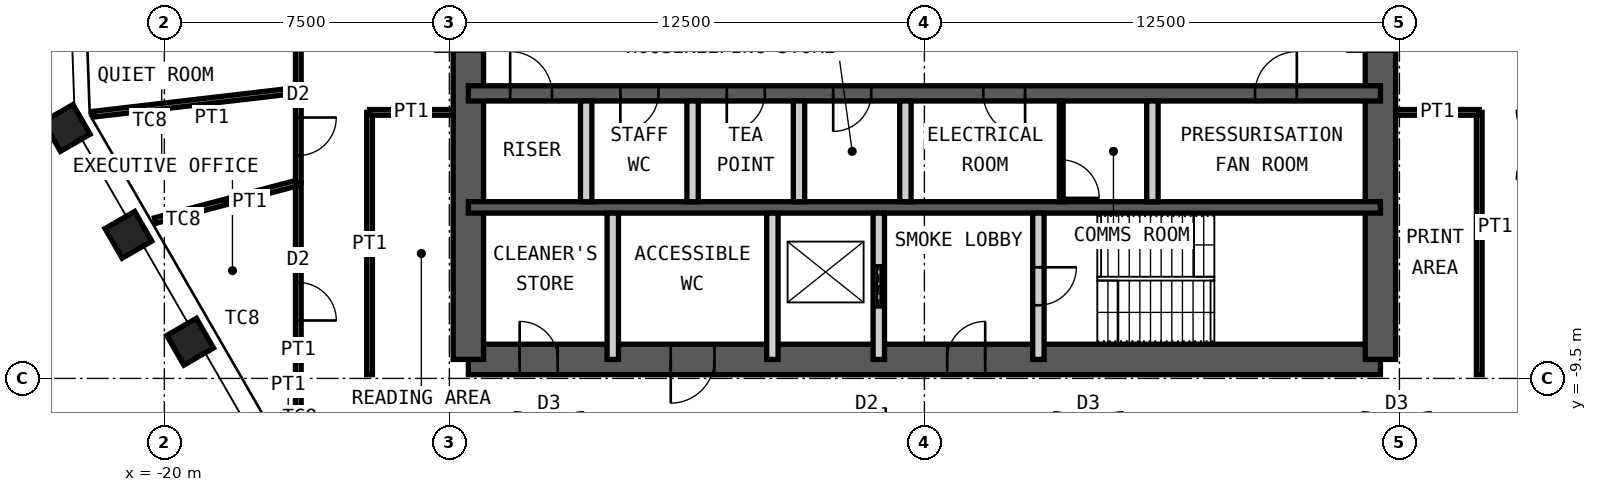
"""IFC4 building model, lengths in metres.
Left out: names, types, materials, properties, quantities, classifications, styles, units other than length and angle.
Written with IfcOpenShell. Run it as: python <this file> out.ifc"""

import sys

from ifc_helpers import new_model, si_unit, direction, frame, frame_2d, origin, origin_2d, place, context, subcontext, project, spatial, rectangle, hollow_rectangle, extrude, element, fill, save


model = new_model("IFC4")
c1 = context("Model", 3, precision=1e-05, world=origin(), true_north=direction((0.0, 1.0)))
c2 = subcontext(c1, "Body", "Model", "MODEL_VIEW")
j1 = project(units=[si_unit("LENGTHUNIT", "METRE"), si_unit("PLANEANGLEUNIT", "RADIAN")], contexts=[c1])
p1 = place(None, origin())
s1 = spatial("IfcSite", under=j1, at=p1, CompositionType="ELEMENT")
p2 = place(p1, origin())
s2 = spatial("IfcBuilding", under=s1, at=p2, CompositionType="ELEMENT")
p3 = place(p2, frame((0.0, 0.0, 325.0)))
s3 = spatial("IfcBuildingStorey", under=s2, at=p3, CompositionType="ELEMENT", Elevation=325.0)
for number, where, z_axis, x_axis in (
    (1, (-19.322, -8.534, 0.0), (0.0, 0.0, 1.0), (0.5, -0.866, 0.0)),
    (2, (-20.946, -5.721, 0.0), (0.0, 0.0, 1.0), (0.5, -0.866, 0.0)),
    (3, (-22.57, -2.908, 0.0), (0.0, 0.0, 1.0), (0.5, -0.866, 0.0)),
):
    element("IfcColumn", number, at=place(p3, frame(where, z_axis=z_axis, x_axis=x_axis)), inside=s3, PredefinedType="COLUMN", context=c2, shape_type="SweptSolid", body=[
        extrude(hollow_rectangle(XDim=0.9, YDim=0.9, WallThickness=0.05, at=origin_2d()), origin(), (0.0, 0.0, 1.0), 4.2),
    ])
p4 = place(p3, frame((-12.0, -9.0, 0.0), z_axis=(0.0, 0.0, 1.0), x_axis=(1.0, 0.0, 0.0)))
e4 = element("IfcWall", 4, at=p4, inside=s3, PredefinedType="SHEAR", context=c2, shape_type="SweptSolid", body=[
    extrude(rectangle(XDim=24.0, YDim=0.8, at=frame_2d((12.0, 0.0))), origin(), (0.0, 0.0, 1.0), 4.2),
])
p5 = place(p4, frame((1.35, 0.0, 0.0)))
e5 = element("IfcOpeningElement", 5, at=p5, cuts=e4, PredefinedType="OPENING", context=c2, shape_type="SweptSolid", body=[
    extrude(rectangle(XDim=1.0, YDim=2.1, at=frame_2d((0.5, 1.05))), frame((0.0, 0.41, 0.0), z_axis=(0.0, -1.0, 0.0), x_axis=(1.0, 0.0, 0.0)), (0.0, 0.0, 1.0), 0.82),
])
p6 = place(p4, frame((5.325, 0.0, 0.0)))
e6 = element("IfcOpeningElement", 6, at=p6, cuts=e4, PredefinedType="OPENING", context=c2, shape_type="SweptSolid", body=[
    extrude(rectangle(XDim=1.15, YDim=2.1, at=frame_2d((0.575, 1.05))), frame((0.0, 0.41, 0.0), z_axis=(0.0, -1.0, 0.0), x_axis=(1.0, 0.0, 0.0)), (0.0, 0.0, 1.0), 0.82),
])
p7 = place(p4, frame((12.6, 0.0, 0.0)))
e7 = element("IfcOpeningElement", 7, at=p7, cuts=e4, PredefinedType="OPENING", context=c2, shape_type="SweptSolid", body=[
    extrude(rectangle(XDim=1.0, YDim=2.1, at=frame_2d((0.5, 1.05))), frame((0.0, 0.41, 0.0), z_axis=(0.0, -1.0, 0.0), x_axis=(1.0, 0.0, 0.0)), (0.0, 0.0, 1.0), 0.82),
])
p8 = place(p3, frame((12.0, -9.0, 0.0), z_axis=(0.0, 0.0, 1.0), x_axis=(0.0, 1.0, 0.0)))
e8 = element("IfcWall", 8, at=p8, inside=s3, PredefinedType="SHEAR", context=c2, shape_type="SweptSolid", body=[
    extrude(rectangle(XDim=18.0, YDim=0.8, at=frame_2d((9.0, 0.0))), origin(), (0.0, 0.0, 1.0), 4.2),
])
p9 = place(p8, frame((8.1, 0.0, 0.0)))
e9 = element("IfcOpeningElement", 9, at=p9, cuts=e8, PredefinedType="OPENING", context=c2, shape_type="SweptSolid", body=[
    extrude(rectangle(XDim=1.8, YDim=2.1, at=frame_2d((0.9, 1.05))), frame((0.0, 0.41, 0.0), z_axis=(0.0, -1.0, 0.0), x_axis=(1.0, 0.0, 0.0)), (0.0, 0.0, 1.0), 0.82),
])
p10 = place(p3, frame((-12.0, -9.0, 0.0), z_axis=(0.0, 0.0, 1.0), x_axis=(0.0, 1.0, 0.0)))
e10 = element("IfcWall", 10, at=p10, inside=s3, PredefinedType="SHEAR", context=c2, shape_type="SweptSolid", body=[
    extrude(rectangle(XDim=18.0, YDim=0.8, at=frame_2d((9.0, 0.0))), origin(), (0.0, 0.0, 1.0), 4.2),
])
p11 = place(p10, frame((8.1, 0.0, 0.0)))
e11 = element("IfcOpeningElement", 11, at=p11, cuts=e10, PredefinedType="OPENING", context=c2, shape_type="SweptSolid", body=[
    extrude(rectangle(XDim=1.8, YDim=2.1, at=frame_2d((0.9, 1.05))), frame((0.0, 0.41, 0.0), z_axis=(0.0, -1.0, 0.0), x_axis=(1.0, 0.0, 0.0)), (0.0, 0.0, 1.0), 0.82),
])
p12 = place(p3, frame((-12.0, -2.0, 0.0), z_axis=(0.0, 0.0, 1.0), x_axis=(1.0, 0.0, 0.0)))
e12 = element("IfcWall", 12, at=p12, inside=s3, PredefinedType="SHEAR", context=c2, shape_type="SweptSolid", body=[
    extrude(rectangle(XDim=24.0, YDim=0.4, at=frame_2d((12.0, 0.0))), origin(), (0.0, 0.0, 1.0), 4.2),
])
p13 = place(p12, frame((1.1, 0.0, 0.0)))
e13 = element("IfcOpeningElement", 13, at=p13, cuts=e12, PredefinedType="OPENING", context=c2, shape_type="SweptSolid", body=[
    extrude(rectangle(XDim=1.1, YDim=2.1, at=frame_2d((0.55, 1.05))), frame((0.0, 0.21, 0.0), z_axis=(0.0, -1.0, 0.0), x_axis=(1.0, 0.0, 0.0)), (0.0, 0.0, 1.0), 0.42),
])
p14 = place(p12, frame((13.55, 0.0, 0.0)))
e14 = element("IfcOpeningElement", 14, at=p14, cuts=e12, PredefinedType="OPENING", context=c2, shape_type="SweptSolid", body=[
    extrude(rectangle(XDim=1.1, YDim=2.1, at=frame_2d((0.55, 1.05))), frame((0.0, 0.21, 0.0), z_axis=(0.0, -1.0, 0.0), x_axis=(1.0, 0.0, 0.0)), (0.0, 0.0, 1.0), 0.42),
])
p15 = place(p12, frame((20.7, 0.0, 0.0)))
e15 = element("IfcOpeningElement", 15, at=p15, cuts=e12, PredefinedType="OPENING", context=c2, shape_type="SweptSolid", body=[
    extrude(rectangle(XDim=1.1, YDim=2.1, at=frame_2d((0.55, 1.05))), frame((0.0, 0.21, 0.0), z_axis=(0.0, -1.0, 0.0), x_axis=(1.0, 0.0, 0.0)), (0.0, 0.0, 1.0), 0.42),
])
p16 = place(p12, frame((4.0, 0.0, 0.0)))
e16 = element("IfcOpeningElement", 16, at=p16, cuts=e12, PredefinedType="OPENING", context=c2, shape_type="SweptSolid", body=[
    extrude(rectangle(XDim=1.0, YDim=2.1, at=frame_2d((0.5, 1.05))), frame((0.0, 0.21, 0.0), z_axis=(0.0, -1.0, 0.0), x_axis=(1.0, 0.0, 0.0)), (0.0, 0.0, 1.0), 0.42),
])
p17 = place(p12, frame((6.8, 0.0, 0.0)))
e17 = element("IfcOpeningElement", 17, at=p17, cuts=e12, PredefinedType="OPENING", context=c2, shape_type="SweptSolid", body=[
    extrude(rectangle(XDim=1.0, YDim=2.1, at=frame_2d((0.5, 1.05))), frame((0.0, 0.21, 0.0), z_axis=(0.0, -1.0, 0.0), x_axis=(1.0, 0.0, 0.0)), (0.0, 0.0, 1.0), 0.42),
])
p18 = place(p12, frame((9.6, 0.0, 0.0)))
e18 = element("IfcOpeningElement", 18, at=p18, cuts=e12, PredefinedType="OPENING", context=c2, shape_type="SweptSolid", body=[
    extrude(rectangle(XDim=1.0, YDim=2.1, at=frame_2d((0.5, 1.05))), frame((0.0, 0.21, 0.0), z_axis=(0.0, -1.0, 0.0), x_axis=(1.0, 0.0, 0.0)), (0.0, 0.0, 1.0), 0.42),
])
p19 = place(p3, frame((-12.0, -5.0, 0.0), z_axis=(0.0, 0.0, 1.0), x_axis=(1.0, 0.0, 0.0)))
e19 = element("IfcWall", 19, at=p19, inside=s3, PredefinedType="SHEAR", context=c2, shape_type="SweptSolid", body=[
    extrude(rectangle(XDim=24.0, YDim=0.3, at=frame_2d((12.0, 0.0))), origin(), (0.0, 0.0, 1.0), 4.2),
])
for number, where, z_axis, x_axis in (
    (20, (-8.9, -4.85, 0.0), (0.0, 0.0, 1.0), (0.0, 1.0, 0.0)),
    (21, (-6.1, -4.85, 0.0), (0.0, 0.0, 1.0), (0.0, 1.0, 0.0)),
    (22, (-3.3, -4.85, 0.0), (0.0, 0.0, 1.0), (0.0, 1.0, 0.0)),
    (23, (-0.5, -4.85, 0.0), (0.0, 0.0, 1.0), (0.0, 1.0, 0.0)),
    (24, (6.0, -4.85, 0.0), (0.0, 0.0, 1.0), (0.0, 1.0, 0.0)),
):
    element("IfcWall", number, at=place(p3, frame(where, z_axis=z_axis, x_axis=x_axis)), inside=s3, PredefinedType="PARTITIONING", context=c2, shape_type="SweptSolid", body=[
        extrude(rectangle(XDim=2.65, YDim=0.3, at=frame_2d((1.325, 0.0))), origin(), (0.0, 0.0, 1.0), 3.98),
    ])
for number, where, z_axis, x_axis in (
    (25, (-8.2, -9.0, 0.0), (0.0, 0.0, 1.0), (0.0, 1.0, 0.0)),
    (26, (-4.0, -9.0, 0.0), (0.0, 0.0, 1.0), (0.0, 1.0, 0.0)),
):
    element("IfcWall", number, at=place(p3, frame(where, z_axis=z_axis, x_axis=x_axis)), inside=s3, PredefinedType="PARTITIONING", context=c2, shape_type="SweptSolid", body=[
        extrude(rectangle(XDim=3.85, YDim=0.3, at=frame_2d((1.925, 0.0))), origin(), (0.0, 0.0, 1.0), 3.98),
    ])
p20 = place(p3, frame((-1.2, -9.0, 0.0), z_axis=(0.0, 0.0, 1.0), x_axis=(0.0, 1.0, 0.0)))
e27 = element("IfcWall", 27, at=p20, inside=s3, PredefinedType="PARTITIONING", context=c2, shape_type="SweptSolid", body=[
    extrude(rectangle(XDim=3.85, YDim=0.3, at=frame_2d((1.925, 0.0))), origin(), (0.0, 0.0, 1.0), 3.98),
])
p21 = place(p20, frame((1.375, 0.0, 0.0)))
e28 = element("IfcOpeningElement", 28, at=p21, cuts=e27, PredefinedType="OPENING", context=c2, shape_type="SweptSolid", body=[
    extrude(rectangle(XDim=1.1, YDim=2.4, at=frame_2d((0.55, 1.2))), frame((0.0, 0.16, 0.0), z_axis=(0.0, -1.0, 0.0), x_axis=(1.0, 0.0, 0.0)), (0.0, 0.0, 1.0), 0.32),
])
p22 = place(p3, frame((3.0, -9.0, 0.0), z_axis=(0.0, 0.0, 1.0), x_axis=(0.0, 1.0, 0.0)))
e29 = element("IfcWall", 29, at=p22, inside=s3, PredefinedType="PARTITIONING", context=c2, shape_type="SweptSolid", body=[
    extrude(rectangle(XDim=3.85, YDim=0.3, at=frame_2d((1.925, 0.0))), origin(), (0.0, 0.0, 1.0), 3.98),
])
p23 = place(p22, frame((1.425, 0.0, 0.0)))
e30 = element("IfcOpeningElement", 30, at=p23, cuts=e29, PredefinedType="OPENING", context=c2, shape_type="SweptSolid", body=[
    extrude(rectangle(XDim=1.0, YDim=2.1, at=frame_2d((0.5, 1.05))), frame((0.0, 0.16, 0.0), z_axis=(0.0, -1.0, 0.0), x_axis=(1.0, 0.0, 0.0)), (0.0, 0.0, 1.0), 0.32),
])
p24 = place(p3, frame((3.6, -4.85, 0.0), z_axis=(0.0, 0.0, 1.0), x_axis=(0.0, 1.0, 0.0)))
e31 = element("IfcWall", 31, at=p24, inside=s3, PredefinedType="PARTITIONING", context=c2, shape_type="SweptSolid", body=[
    extrude(rectangle(XDim=2.65, YDim=0.1, at=frame_2d((1.325, 0.0))), origin(), (0.0, 0.0, 1.0), 3.98),
])
p25 = place(p24, frame((0.1, 0.0, 0.0)))
e32 = element("IfcOpeningElement", 32, at=p25, cuts=e31, PredefinedType="OPENING", context=c2, shape_type="SweptSolid", body=[
    extrude(rectangle(XDim=1.0, YDim=2.4, at=frame_2d((0.5, 1.2))), frame((0.0, 0.06, 0.0), z_axis=(0.0, -1.0, 0.0), x_axis=(1.0, 0.0, 0.0)), (0.0, 0.0, 1.0), 0.12),
])
p26 = place(p3, frame((-16.475, -10.601, 0.0), z_axis=(0.0, 0.0, 1.0), x_axis=(0.0, 1.0, 0.0)))
e33 = element("IfcWall", 33, at=p26, inside=s3, PredefinedType="PARTITIONING", context=c2, shape_type="SweptSolid", body=[
    extrude(rectangle(XDim=6.25, YDim=0.15, at=frame_2d((3.125, 0.0))), origin(), (0.0, 0.0, 1.0), 4.03),
])
p27 = place(p26, frame((2.625, 0.0, 0.0)))
e34 = element("IfcOpeningElement", 34, at=p27, cuts=e33, PredefinedType="OPENING", context=c2, shape_type="SweptSolid", body=[
    extrude(rectangle(XDim=1.0, YDim=2.4, at=frame_2d((0.5, 1.2))), frame((0.0, 0.085, 0.0), z_axis=(0.0, -1.0, 0.0), x_axis=(1.0, 0.0, 0.0)), (0.0, 0.0, 1.0), 0.17),
])
p28 = place(p3, frame((-20.243, -5.346, 0.0), z_axis=(0.0, 0.0, 1.0), x_axis=(0.966843659694, 0.25536902261, 0.0)))
e35 = element("IfcWall", 35, at=p28, inside=s3, PredefinedType="PARTITIONING", context=c2, shape_type="SweptSolid", body=[
    extrude(rectangle(XDim=3.897, YDim=0.15, at=frame_2d((1.948, 0.0))), origin(), (0.0, 0.0, 1.0), 3.33),
])
p29 = place(p3, frame((-16.475, -4.351, 0.0), z_axis=(0.0, 0.0, 1.0), x_axis=(0.0, 1.0, 0.0)))
e36 = element("IfcWall", 36, at=p29, inside=s3, PredefinedType="PARTITIONING", context=c2, shape_type="SweptSolid", body=[
    extrude(rectangle(XDim=2.432, YDim=0.15, at=frame_2d((1.216, 0.0))), origin(), (0.0, 0.0, 1.0), 4.03),
])
p30 = place(p29, frame((0.716, 0.0, 0.0)))
e37 = element("IfcOpeningElement", 37, at=p30, cuts=e36, PredefinedType="OPENING", context=c2, shape_type="SweptSolid", body=[
    extrude(rectangle(XDim=1.0, YDim=2.4, at=frame_2d((0.5, 1.2))), frame((0.0, 0.085, 0.0), z_axis=(0.0, -1.0, 0.0), x_axis=(1.0, 0.0, 0.0)), (0.0, 0.0, 1.0), 0.17),
])
p31 = place(p3, frame((-21.864, -2.547, 0.0), z_axis=(0.0, 0.0, 1.0), x_axis=(0.993284789299, 0.115694975458, 0.0)))
e38 = element("IfcWall", 38, at=p31, inside=s3, PredefinedType="PARTITIONING", context=c2, shape_type="SweptSolid", body=[
    extrude(rectangle(XDim=5.425, YDim=0.15, at=frame_2d((2.713, 0.0))), origin(), (0.0, 0.0, 1.0), 2.93),
])
p32 = place(p3, frame((-16.475, -1.919, 0.0), z_axis=(0.0, 0.0, 1.0), x_axis=(0.0, 1.0, 0.0)))
e39 = element("IfcWall", 39, at=p32, inside=s3, PredefinedType="PARTITIONING", context=c2, shape_type="SweptSolid", body=[
    extrude(rectangle(XDim=5.06, YDim=0.15, at=frame_2d((2.53, 0.0))), origin(), (0.0, 0.0, 1.0), 4.03),
])
p33 = place(p32, frame((2.03, 0.0, 0.0)))
e40 = element("IfcOpeningElement", 40, at=p33, cuts=e39, PredefinedType="OPENING", context=c2, shape_type="SweptSolid", body=[
    extrude(rectangle(XDim=1.0, YDim=2.4, at=frame_2d((0.5, 1.2))), frame((0.0, 0.085, 0.0), z_axis=(0.0, -1.0, 0.0), x_axis=(1.0, 0.0, 0.0)), (0.0, 0.0, 1.0), 0.17),
])
p34 = place(p3, frame((14.6, -9.4, 0.0), z_axis=(0.0, 0.0, 1.0), x_axis=(0.0, 1.0, 0.0)))
e41 = element("IfcWall", 41, at=p34, inside=s3, PredefinedType="PARTITIONING", context=c2, shape_type="SweptSolid", body=[
    extrude(rectangle(XDim=6.9, YDim=0.15, at=frame_2d((3.45, 0.0))), origin(), (0.0, 0.0, 1.0), 4.03),
])
p35 = place(p3, frame((12.4, -2.5, 0.0), z_axis=(0.0, 0.0, 1.0), x_axis=(1.0, 0.0, 0.0)))
e42 = element("IfcWall", 42, at=p35, inside=s3, PredefinedType="PARTITIONING", context=c2, shape_type="SweptSolid", body=[
    extrude(rectangle(XDim=2.2, YDim=0.15, at=frame_2d((1.1, 0.0))), origin(), (0.0, 0.0, 1.0), 3.33),
])
p36 = place(p3, frame((-14.6, -9.4, 0.0), z_axis=(0.0, 0.0, 1.0), x_axis=(0.0, 1.0, 0.0)))
e43 = element("IfcWall", 43, at=p36, inside=s3, PredefinedType="PARTITIONING", context=c2, shape_type="SweptSolid", body=[
    extrude(rectangle(XDim=6.9, YDim=0.15, at=frame_2d((3.45, 0.0))), origin(), (0.0, 0.0, 1.0), 4.03),
])
p37 = place(p3, frame((-12.4, -2.5, 0.0), z_axis=(0.0, 0.0, 1.0), x_axis=(-1.0, 0.0, 0.0)))
e44 = element("IfcWall", 44, at=p37, inside=s3, PredefinedType="PARTITIONING", context=c2, shape_type="SweptSolid", body=[
    extrude(rectangle(XDim=2.2, YDim=0.15, at=frame_2d((1.1, 0.0))), origin(), (0.0, 0.0, 1.0), 3.53),
])
p38 = place(p5, origin())
e45 = element("IfcDoor", 45, at=p38, inside=s3, OperationType="SINGLE_SWING_RIGHT", PredefinedType="DOOR", context=c2, shape_type="SweptSolid", body=[
    extrude(rectangle(XDim=1.0, YDim=2.1, at=frame_2d((0.5, 1.05))), frame((0.0, 0.025, 0.0), z_axis=(0.0, -1.0, 0.0), x_axis=(1.0, 0.0, 0.0)), (0.0, 0.0, 1.0), 0.05),
])
fill(e5, e45)
p39 = place(p6, origin())
e46 = element("IfcDoor", 46, at=p39, inside=s3, OperationType="SINGLE_SWING_LEFT", PredefinedType="DOOR", context=c2, shape_type="SweptSolid", body=[
    extrude(rectangle(XDim=1.15, YDim=2.1, at=frame_2d((0.575, 1.05))), frame((0.0, 0.025, 0.0), z_axis=(0.0, -1.0, 0.0), x_axis=(1.0, 0.0, 0.0)), (0.0, 0.0, 1.0), 0.05),
])
fill(e6, e46)
p40 = place(p7, origin())
e47 = element("IfcDoor", 47, at=p40, inside=s3, OperationType="SINGLE_SWING_LEFT", PredefinedType="DOOR", context=c2, shape_type="SweptSolid", body=[
    extrude(rectangle(XDim=1.0, YDim=2.1, at=frame_2d((0.5, 1.05))), frame((0.0, 0.025, 0.0), z_axis=(0.0, -1.0, 0.0), x_axis=(1.0, 0.0, 0.0)), (0.0, 0.0, 1.0), 0.05),
])
fill(e7, e47)
p41 = place(p23, origin())
e48 = element("IfcDoor", 48, at=p41, inside=s3, OperationType="SINGLE_SWING_RIGHT", PredefinedType="DOOR", context=c2, shape_type="SweptSolid", body=[
    extrude(rectangle(XDim=1.0, YDim=2.1, at=frame_2d((0.5, 1.05))), frame((0.0, 0.025, 0.0), z_axis=(0.0, -1.0, 0.0), x_axis=(1.0, 0.0, 0.0)), (0.0, 0.0, 1.0), 0.05),
])
fill(e30, e48)
p42 = place(p13, origin())
e49 = element("IfcDoor", 49, at=p42, inside=s3, OperationType="SINGLE_SWING_RIGHT", PredefinedType="DOOR", context=c2, shape_type="SweptSolid", body=[
    extrude(rectangle(XDim=1.1, YDim=2.1, at=frame_2d((0.55, 1.05))), frame((0.0, 0.025, 0.0), z_axis=(0.0, -1.0, 0.0), x_axis=(1.0, 0.0, 0.0)), (0.0, 0.0, 1.0), 0.05),
])
fill(e13, e49)
p43 = place(p14, origin())
e50 = element("IfcDoor", 50, at=p43, inside=s3, OperationType="SINGLE_SWING_RIGHT", PredefinedType="DOOR", context=c2, shape_type="SweptSolid", body=[
    extrude(rectangle(XDim=1.1, YDim=2.1, at=frame_2d((0.55, 1.05))), frame((0.0, 0.025, 0.0), z_axis=(0.0, -1.0, 0.0), x_axis=(1.0, 0.0, 0.0)), (0.0, 0.0, 1.0), 0.05),
])
fill(e14, e50)
p44 = place(p15, origin())
e51 = element("IfcDoor", 51, at=p44, inside=s3, OperationType="SINGLE_SWING_LEFT", PredefinedType="DOOR", context=c2, shape_type="SweptSolid", body=[
    extrude(rectangle(XDim=1.1, YDim=2.1, at=frame_2d((0.55, 1.05))), frame((0.0, 0.025, 0.0), z_axis=(0.0, -1.0, 0.0), x_axis=(1.0, 0.0, 0.0)), (0.0, 0.0, 1.0), 0.05),
])
fill(e15, e51)
p45 = place(p21, origin())
e52 = element("IfcDoor", 52, at=p45, inside=s3, OperationType="DOUBLE_DOOR_SLIDING", PredefinedType="DOOR", context=c2, shape_type="SweptSolid", body=[
    extrude(rectangle(XDim=1.1, YDim=2.4, at=frame_2d((0.55, 1.2))), frame((0.0, 0.025, 0.0), z_axis=(0.0, -1.0, 0.0), x_axis=(1.0, 0.0, 0.0)), (0.0, 0.0, 1.0), 0.05),
])
fill(e28, e52)
p46 = place(p16, origin())
e53 = element("IfcDoor", 53, at=p46, inside=s3, OperationType="SINGLE_SWING_LEFT", PredefinedType="DOOR", context=c2, shape_type="SweptSolid", body=[
    extrude(rectangle(XDim=1.0, YDim=2.1, at=frame_2d((0.5, 1.05))), frame((0.0, 0.025, 0.0), z_axis=(0.0, -1.0, 0.0), x_axis=(1.0, 0.0, 0.0)), (0.0, 0.0, 1.0), 0.05),
])
fill(e16, e53)
p47 = place(p17, origin())
e54 = element("IfcDoor", 54, at=p47, inside=s3, OperationType="SINGLE_SWING_LEFT", PredefinedType="DOOR", context=c2, shape_type="SweptSolid", body=[
    extrude(rectangle(XDim=1.0, YDim=2.1, at=frame_2d((0.5, 1.05))), frame((0.0, 0.025, 0.0), z_axis=(0.0, -1.0, 0.0), x_axis=(1.0, 0.0, 0.0)), (0.0, 0.0, 1.0), 0.05),
])
fill(e17, e54)
p48 = place(p18, origin())
e55 = element("IfcDoor", 55, at=p48, inside=s3, OperationType="SINGLE_SWING_LEFT", PredefinedType="DOOR", context=c2, shape_type="SweptSolid", body=[
    extrude(rectangle(XDim=1.0, YDim=2.1, at=frame_2d((0.5, 1.05))), frame((0.0, 0.025, 0.0), z_axis=(0.0, -1.0, 0.0), x_axis=(1.0, 0.0, 0.0)), (0.0, 0.0, 1.0), 0.05),
])
fill(e18, e55)
p49 = place(p25, origin())
e56 = element("IfcDoor", 56, at=p49, inside=s3, OperationType="SINGLE_SWING_LEFT", PredefinedType="DOOR", context=c2, shape_type="SweptSolid", body=[
    extrude(rectangle(XDim=1.0, YDim=2.4, at=frame_2d((0.5, 1.2))), frame((0.0, 0.025, 0.0), z_axis=(0.0, -1.0, 0.0), x_axis=(1.0, 0.0, 0.0)), (0.0, 0.0, 1.0), 0.05),
])
fill(e32, e56)
p50 = place(p27, origin())
e57 = element("IfcDoor", 57, at=p50, inside=s3, OperationType="SINGLE_SWING_LEFT", PredefinedType="DOOR", context=c2, shape_type="SweptSolid", body=[
    extrude(rectangle(XDim=1.0, YDim=2.4, at=frame_2d((0.5, 1.2))), frame((0.0, 0.025, 0.0), z_axis=(0.0, -1.0, 0.0), x_axis=(1.0, 0.0, 0.0)), (0.0, 0.0, 1.0), 0.05),
])
fill(e34, e57)
p51 = place(p30, origin())
e58 = element("IfcDoor", 58, at=p51, inside=s3, OperationType="SINGLE_SWING_RIGHT", PredefinedType="DOOR", context=c2, shape_type="SweptSolid", body=[
    extrude(rectangle(XDim=1.0, YDim=2.4, at=frame_2d((0.5, 1.2))), frame((0.0, 0.025, 0.0), z_axis=(0.0, -1.0, 0.0), x_axis=(1.0, 0.0, 0.0)), (0.0, 0.0, 1.0), 0.05),
])
fill(e37, e58)
save(model, sys.argv[1])
